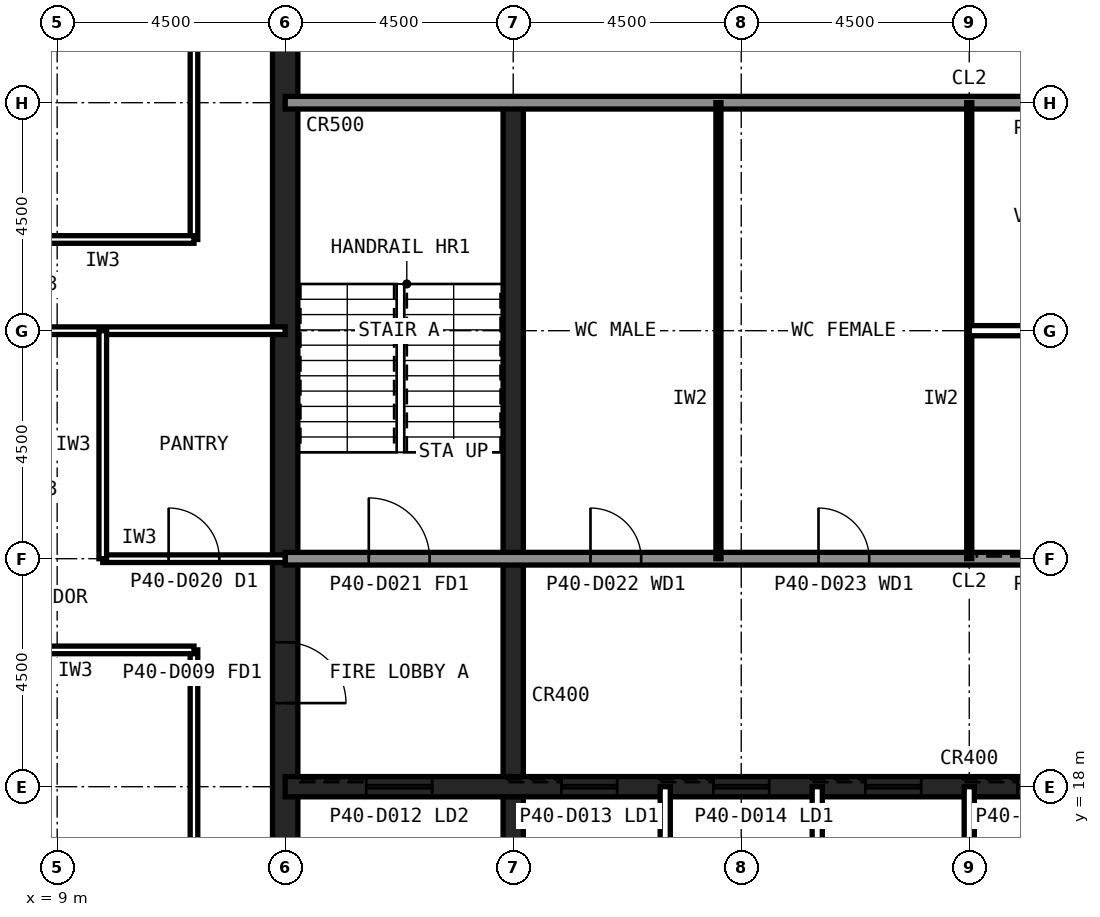
"""IFC4 building model, lengths in metres.
Left out: names, types, materials, properties, quantities, classifications, styles, units other than length and angle.
Written with IfcOpenShell. Run it as: python <this file> out.ifc"""

import sys

from ifc_helpers import new_model, si_unit, direction, frame, frame_2d, origin, place, context, subcontext, project, spatial, rectangle, extrude, element, fill, save


model = new_model("IFC4")
c1 = context("Model", 3, precision=1e-05, world=origin(), true_north=direction((0.0, 1.0)))
c2 = subcontext(c1, "Body", "Model", "MODEL_VIEW")
j1 = project(units=[si_unit("LENGTHUNIT", "METRE"), si_unit("PLANEANGLEUNIT", "RADIAN")], contexts=[c1])
p1 = place(None, origin())
s1 = spatial("IfcSite", under=j1, at=p1, CompositionType="ELEMENT")
p2 = place(p1, origin())
s2 = spatial("IfcBuilding", under=s1, at=p2, CompositionType="ELEMENT")
p3 = place(p2, frame((0.0, 0.0, 167.6)))
s3 = spatial("IfcBuildingStorey", under=s2, at=p3, CompositionType="ELEMENT", Elevation=167.6)
p4 = place(p3, frame((13.5, 40.5, 0.0), z_axis=(0.0, 0.0, 1.0), x_axis=(0.0, -1.0, 0.0)))
e1 = element("IfcWall", 1, at=p4, inside=s3, PredefinedType="SHEAR", context=c2, shape_type="SweptSolid", body=[
    extrude(rectangle(XDim=27.0, YDim=0.5, at=frame_2d((13.5, 0.0))), origin(), (0.0, 0.0, 1.0), 4.0),
])
p5 = place(p4, frame((19.65, 0.0, 0.0)))
e2 = element("IfcOpeningElement", 2, at=p5, cuts=e1, PredefinedType="OPENING", context=c2, shape_type="SweptSolid", body=[
    extrude(rectangle(XDim=1.2, YDim=2.1, at=frame_2d((0.6, 1.05))), frame((0.0, 0.26, 0.0), z_axis=(0.0, -1.0, 0.0), x_axis=(1.0, 0.0, 0.0)), (0.0, 0.0, 1.0), 0.52),
])
p6 = place(p4, frame((5.85, 0.0, 0.0)))
e3 = element("IfcOpeningElement", 3, at=p6, cuts=e1, PredefinedType="OPENING", context=c2, shape_type="SweptSolid", body=[
    extrude(rectangle(XDim=1.8, YDim=2.1, at=frame_2d((0.9, 1.05))), frame((0.0, 0.26, 0.0), z_axis=(0.0, -1.0, 0.0), x_axis=(1.0, 0.0, 0.0)), (0.0, 0.0, 1.0), 0.52),
])
p7 = place(p3, frame((18.0, 13.5, 0.0), z_axis=(0.0, 0.0, 1.0), x_axis=(0.0, 1.0, 0.0)))
e4 = element("IfcWall", 4, at=p7, inside=s3, PredefinedType="SHEAR", context=c2, shape_type="SweptSolid", body=[
    extrude(rectangle(XDim=18.0, YDim=0.4, at=frame_2d((9.0, 0.0))), origin(), (0.0, 0.0, 1.0), 4.0),
])
p8 = place(p3, frame((13.5, 18.0, 0.0), z_axis=(0.0, 0.0, 1.0), x_axis=(1.0, 0.0, 0.0)))
e5 = element("IfcWall", 5, at=p8, inside=s3, PredefinedType="SHEAR", context=c2, shape_type="SweptSolid", body=[
    extrude(rectangle(XDim=27.0, YDim=0.4, at=frame_2d((13.5, 0.0))), origin(), (0.0, 0.0, 1.0), 4.0),
])
p9 = place(p8, frame((24.3, 0.0, 0.0)))
e6 = element("IfcOpeningElement", 6, at=p9, cuts=e5, PredefinedType="OPENING", context=c2, shape_type="SweptSolid", body=[
    extrude(rectangle(XDim=0.9, YDim=2.1, at=frame_2d((0.45, 1.05))), frame((0.0, 0.21, 0.0), z_axis=(0.0, -1.0, 0.0), x_axis=(1.0, 0.0, 0.0)), (0.0, 0.0, 1.0), 0.42),
])
p10 = place(p8, frame((5.45, 0.0, 0.0)))
e7 = element("IfcOpeningElement", 7, at=p10, cuts=e5, PredefinedType="OPENING", context=c2, shape_type="SweptSolid", body=[
    extrude(rectangle(XDim=1.1, YDim=2.1, at=frame_2d((0.55, 1.05))), frame((0.0, 0.21, 0.0), z_axis=(0.0, -1.0, 0.0), x_axis=(1.0, 0.0, 0.0)), (0.0, 0.0, 1.0), 0.42),
])
p11 = place(p8, frame((8.45, 0.0, 0.0)))
e8 = element("IfcOpeningElement", 8, at=p11, cuts=e5, PredefinedType="OPENING", context=c2, shape_type="SweptSolid", body=[
    extrude(rectangle(XDim=1.1, YDim=2.1, at=frame_2d((0.55, 1.05))), frame((0.0, 0.21, 0.0), z_axis=(0.0, -1.0, 0.0), x_axis=(1.0, 0.0, 0.0)), (0.0, 0.0, 1.0), 0.42),
])
p12 = place(p8, frame((11.45, 0.0, 0.0)))
e9 = element("IfcOpeningElement", 9, at=p12, cuts=e5, PredefinedType="OPENING", context=c2, shape_type="SweptSolid", body=[
    extrude(rectangle(XDim=1.1, YDim=2.1, at=frame_2d((0.55, 1.05))), frame((0.0, 0.21, 0.0), z_axis=(0.0, -1.0, 0.0), x_axis=(1.0, 0.0, 0.0)), (0.0, 0.0, 1.0), 0.42),
])
p13 = place(p8, frame((14.45, 0.0, 0.0)))
e10 = element("IfcOpeningElement", 10, at=p13, cuts=e5, PredefinedType="OPENING", context=c2, shape_type="SweptSolid", body=[
    extrude(rectangle(XDim=1.1, YDim=2.1, at=frame_2d((0.55, 1.05))), frame((0.0, 0.21, 0.0), z_axis=(0.0, -1.0, 0.0), x_axis=(1.0, 0.0, 0.0)), (0.0, 0.0, 1.0), 0.42),
])
p14 = place(p8, frame((17.45, 0.0, 0.0)))
e11 = element("IfcOpeningElement", 11, at=p14, cuts=e5, PredefinedType="OPENING", context=c2, shape_type="SweptSolid", body=[
    extrude(rectangle(XDim=1.1, YDim=2.1, at=frame_2d((0.55, 1.05))), frame((0.0, 0.21, 0.0), z_axis=(0.0, -1.0, 0.0), x_axis=(1.0, 0.0, 0.0)), (0.0, 0.0, 1.0), 0.42),
])
p15 = place(p8, frame((20.45, 0.0, 0.0)))
e12 = element("IfcOpeningElement", 12, at=p15, cuts=e5, PredefinedType="OPENING", context=c2, shape_type="SweptSolid", body=[
    extrude(rectangle(XDim=1.1, YDim=2.1, at=frame_2d((0.55, 1.05))), frame((0.0, 0.21, 0.0), z_axis=(0.0, -1.0, 0.0), x_axis=(1.0, 0.0, 0.0)), (0.0, 0.0, 1.0), 0.42),
])
p16 = place(p8, frame((1.6, 0.0, 0.0)))
e13 = element("IfcOpeningElement", 13, at=p16, cuts=e5, PredefinedType="OPENING", context=c2, shape_type="SweptSolid", body=[
    extrude(rectangle(XDim=1.3, YDim=2.2, at=frame_2d((0.65, 1.1))), frame((0.0, 0.21, 0.0), z_axis=(0.0, -1.0, 0.0), x_axis=(1.0, 0.0, 0.0)), (0.0, 0.0, 1.0), 0.42),
])
p17 = place(p3, frame((13.5, 22.5, 0.0), z_axis=(0.0, 0.0, 1.0), x_axis=(1.0, 0.0, 0.0)))
e14 = element("IfcWall", 14, at=p17, inside=s3, PredefinedType="SOLIDWALL", context=c2, shape_type="SweptSolid", body=[
    extrude(rectangle(XDim=27.0, YDim=0.25, at=frame_2d((13.5, 0.0))), origin(), (0.0, 0.0, 1.0), 3.84),
])
p18 = place(p17, frame((1.65, 0.0, 0.0)))
e15 = element("IfcOpeningElement", 15, at=p18, cuts=e14, PredefinedType="OPENING", context=c2, shape_type="SweptSolid", body=[
    extrude(rectangle(XDim=1.2, YDim=2.1, at=frame_2d((0.6, 1.05))), frame((0.0, 0.135, 0.0), z_axis=(0.0, -1.0, 0.0), x_axis=(1.0, 0.0, 0.0)), (0.0, 0.0, 1.0), 0.27),
])
p19 = place(p17, frame((6.025, 0.0, 0.0)))
e16 = element("IfcOpeningElement", 16, at=p19, cuts=e14, PredefinedType="OPENING", context=c2, shape_type="SweptSolid", body=[
    extrude(rectangle(XDim=1.0, YDim=2.1, at=frame_2d((0.5, 1.05))), frame((0.0, 0.135, 0.0), z_axis=(0.0, -1.0, 0.0), x_axis=(1.0, 0.0, 0.0)), (0.0, 0.0, 1.0), 0.27),
])
p20 = place(p17, frame((10.525, 0.0, 0.0)))
e17 = element("IfcOpeningElement", 17, at=p20, cuts=e14, PredefinedType="OPENING", context=c2, shape_type="SweptSolid", body=[
    extrude(rectangle(XDim=1.0, YDim=2.1, at=frame_2d((0.5, 1.05))), frame((0.0, 0.135, 0.0), z_axis=(0.0, -1.0, 0.0), x_axis=(1.0, 0.0, 0.0)), (0.0, 0.0, 1.0), 0.27),
])
p21 = place(p17, frame((19.75, 0.0, 0.0)))
e18 = element("IfcOpeningElement", 18, at=p21, cuts=e14, PredefinedType="OPENING", context=c2, shape_type="SweptSolid", body=[
    extrude(rectangle(XDim=1.0, YDim=2.1, at=frame_2d((0.5, 1.05))), frame((0.0, 0.135, 0.0), z_axis=(0.0, -1.0, 0.0), x_axis=(1.0, 0.0, 0.0)), (0.0, 0.0, 1.0), 0.27),
])
p22 = place(p17, frame((15.05, 0.0, 0.0)))
e19 = element("IfcOpeningElement", 19, at=p22, cuts=e14, PredefinedType="OPENING", context=c2, shape_type="SweptSolid", body=[
    extrude(rectangle(XDim=1.4, YDim=2.4, at=frame_2d((0.7, 1.2))), frame((0.0, 0.135, 0.0), z_axis=(0.0, -1.0, 0.0), x_axis=(1.0, 0.0, 0.0)), (0.0, 0.0, 1.0), 0.27),
])
p23 = place(p3, frame((13.5, 31.5, 0.0), z_axis=(0.0, 0.0, 1.0), x_axis=(1.0, 0.0, 0.0)))
e20 = element("IfcWall", 20, at=p23, inside=s3, PredefinedType="SOLIDWALL", context=c2, shape_type="SweptSolid", body=[
    extrude(rectangle(XDim=27.0, YDim=0.25, at=frame_2d((13.5, 0.0))), origin(), (0.0, 0.0, 1.0), 3.84),
])
p24 = place(p23, frame((24.15, 0.0, 0.0)))
e21 = element("IfcOpeningElement", 21, at=p24, cuts=e20, PredefinedType="OPENING", context=c2, shape_type="SweptSolid", body=[
    extrude(rectangle(XDim=1.2, YDim=2.1, at=frame_2d((0.6, 1.05))), frame((0.0, 0.135, 0.0), z_axis=(0.0, -1.0, 0.0), x_axis=(1.0, 0.0, 0.0)), (0.0, 0.0, 1.0), 0.27),
])
p25 = place(p23, frame((15.3, 0.0, 0.0)))
e22 = element("IfcOpeningElement", 22, at=p25, cuts=e20, PredefinedType="OPENING", context=c2, shape_type="SweptSolid", body=[
    extrude(rectangle(XDim=0.9, YDim=2.1, at=frame_2d((0.45, 1.05))), frame((0.0, 0.135, 0.0), z_axis=(0.0, -1.0, 0.0), x_axis=(1.0, 0.0, 0.0)), (0.0, 0.0, 1.0), 0.27),
])
p26 = place(p23, frame((19.8, 0.0, 0.0)))
e23 = element("IfcOpeningElement", 23, at=p26, cuts=e20, PredefinedType="OPENING", context=c2, shape_type="SweptSolid", body=[
    extrude(rectangle(XDim=0.9, YDim=2.1, at=frame_2d((0.45, 1.05))), frame((0.0, 0.135, 0.0), z_axis=(0.0, -1.0, 0.0), x_axis=(1.0, 0.0, 0.0)), (0.0, 0.0, 1.0), 0.27),
])
for number, where, z_axis, x_axis in (
    (24, (21.0, 13.5, 0.0), (0.0, 0.0, 1.0), (0.0, 1.0, 0.0)),
    (25, (24.0, 13.5, 0.0), (0.0, 0.0, 1.0), (0.0, 1.0, 0.0)),
    (26, (27.0, 13.5, 0.0), (0.0, 0.0, 1.0), (0.0, 1.0, 0.0)),
):
    element("IfcWall", number, at=place(p3, frame(where, z_axis=z_axis, x_axis=x_axis)), inside=s3, PredefinedType="PARTITIONING", context=c2, shape_type="SweptSolid", body=[
        extrude(rectangle(XDim=4.5, YDim=0.2, at=frame_2d((2.25, 0.0))), origin(), (0.0, 0.0, 1.0), 3.84),
    ])
for number, where, z_axis, x_axis in (
    (27, (22.05, 22.5, 0.0), (0.0, 0.0, 1.0), (0.0, 1.0, 0.0)),
    (28, (27.0, 22.5, 0.0), (0.0, 0.0, 1.0), (0.0, 1.0, 0.0)),
):
    element("IfcWall", number, at=place(p3, frame(where, z_axis=z_axis, x_axis=x_axis)), inside=s3, PredefinedType="PLUMBINGWALL", context=c2, shape_type="SweptSolid", body=[
        extrude(rectangle(XDim=9.0, YDim=0.1, at=frame_2d((4.5, 0.0))), origin(), (0.0, 0.0, 1.0), 3.84),
    ])
p27 = place(p3, frame((27.0, 27.0, 0.0), z_axis=(0.0, 0.0, 1.0), x_axis=(1.0, 0.0, 0.0)))
e29 = element("IfcWall", 29, at=p27, inside=s3, PredefinedType="PARTITIONING", context=c2, shape_type="SweptSolid", body=[
    extrude(rectangle(XDim=9.0, YDim=0.2, at=frame_2d((4.5, 0.0))), origin(), (0.0, 0.0, 1.0), 3.84),
])
p28 = place(p3, frame((0.36, 27.0, 0.0), z_axis=(0.0, 0.0, 1.0), x_axis=(1.0, 0.0, 0.0)))
e30 = element("IfcWall", 30, at=p28, inside=s3, PredefinedType="PARTITIONING", context=c2, shape_type="SweptSolid", body=[
    extrude(rectangle(XDim=13.14, YDim=0.15, at=frame_2d((6.57, 0.0))), origin(), (0.0, 0.0, 1.0), 2.989),
])
p29 = place(p3, frame((11.7, 45.3, 0.0), z_axis=(0.0, 0.0, 1.0), x_axis=(0.0, -1.0, 0.0)))
e31 = element("IfcWall", 31, at=p29, inside=s3, PredefinedType="PARTITIONING", context=c2, shape_type="SweptSolid", body=[
    extrude(rectangle(XDim=16.5, YDim=0.15, at=frame_2d((8.25, 0.0))), origin(), (0.0, 0.0, 1.0), 3.84),
])
p30 = place(p29, frame((7.75, 0.0, 0.0)))
e32 = element("IfcOpeningElement", 32, at=p30, cuts=e31, PredefinedType="OPENING", context=c2, shape_type="SweptSolid", body=[
    extrude(rectangle(XDim=1.0, YDim=2.1, at=frame_2d((0.5, 1.05))), frame((0.0, 0.085, 0.0), z_axis=(0.0, -1.0, 0.0), x_axis=(1.0, 0.0, 0.0)), (0.0, 0.0, 1.0), 0.17),
])
p31 = place(p3, frame((11.7, 28.8, 0.0), z_axis=(0.0, 0.0, 1.0), x_axis=(-1.0, 0.0, 0.0)))
e33 = element("IfcWall", 33, at=p31, inside=s3, PredefinedType="PARTITIONING", context=c2, shape_type="SweptSolid", body=[
    extrude(rectangle(XDim=3.6, YDim=0.15, at=frame_2d((1.8, 0.0))), origin(), (0.0, 0.0, 1.0), 3.84),
])
p32 = place(p3, frame((11.7, 20.7, 0.0), z_axis=(0.0, 0.0, 1.0), x_axis=(0.0, -1.0, 0.0)))
e34 = element("IfcWall", 34, at=p32, inside=s3, PredefinedType="PARTITIONING", context=c2, shape_type="SweptSolid", body=[
    extrude(rectangle(XDim=15.135, YDim=0.15, at=frame_2d((7.568, 0.0))), origin(), (0.0, 0.0, 1.0), 3.84),
])
p33 = place(p32, frame((6.7, 0.0, 0.0)))
e35 = element("IfcOpeningElement", 35, at=p33, cuts=e34, PredefinedType="OPENING", context=c2, shape_type="SweptSolid", body=[
    extrude(rectangle(XDim=1.0, YDim=2.1, at=frame_2d((0.5, 1.05))), frame((0.0, 0.085, 0.0), z_axis=(0.0, -1.0, 0.0), x_axis=(1.0, 0.0, 0.0)), (0.0, 0.0, 1.0), 0.17),
])
p34 = place(p3, frame((8.1, 20.7, 0.0), z_axis=(0.0, 0.0, 1.0), x_axis=(1.0, 0.0, 0.0)))
e36 = element("IfcWall", 36, at=p34, inside=s3, PredefinedType="PARTITIONING", context=c2, shape_type="SweptSolid", body=[
    extrude(rectangle(XDim=3.6, YDim=0.15, at=frame_2d((1.8, 0.0))), origin(), (0.0, 0.0, 1.0), 3.84),
])
p35 = place(p3, frame((9.9, 22.5, 0.0), z_axis=(0.0, 0.0, 1.0), x_axis=(1.0, 0.0, 0.0)))
e37 = element("IfcWall", 37, at=p35, inside=s3, PredefinedType="PARTITIONING", context=c2, shape_type="SweptSolid", body=[
    extrude(rectangle(XDim=3.6, YDim=0.15, at=frame_2d((1.8, 0.0))), origin(), (0.0, 0.0, 1.0), 2.989),
])
p36 = place(p35, frame((1.3, 0.0, 0.0)))
e38 = element("IfcOpeningElement", 38, at=p36, cuts=e37, PredefinedType="OPENING", context=c2, shape_type="SweptSolid", body=[
    extrude(rectangle(XDim=1.0, YDim=2.1, at=frame_2d((0.5, 1.05))), frame((0.0, 0.085, 0.0), z_axis=(0.0, -1.0, 0.0), x_axis=(1.0, 0.0, 0.0)), (0.0, 0.0, 1.0), 0.17),
])
p37 = place(p3, frame((9.9, 27.0, 0.0), z_axis=(0.0, 0.0, 1.0), x_axis=(0.0, -1.0, 0.0)))
e39 = element("IfcWall", 39, at=p37, inside=s3, PredefinedType="PARTITIONING", context=c2, shape_type="SweptSolid", body=[
    extrude(rectangle(XDim=4.5, YDim=0.15, at=frame_2d((2.25, 0.0))), origin(), (0.0, 0.0, 1.0), 3.84),
])
p38 = place(p5, origin())
e40 = element("IfcDoor", 40, at=p38, inside=s3, OperationType="SINGLE_SWING_RIGHT", PredefinedType="DOOR", context=c2, shape_type="SweptSolid", body=[
    extrude(rectangle(XDim=1.2, YDim=2.1, at=frame_2d((0.6, 1.05))), frame((0.0, 0.025, 0.0), z_axis=(0.0, -1.0, 0.0), x_axis=(1.0, 0.0, 0.0)), (0.0, 0.0, 1.0), 0.05),
])
fill(e2, e40)
p39 = place(p18, origin())
e41 = element("IfcDoor", 41, at=p39, inside=s3, OperationType="SINGLE_SWING_LEFT", PredefinedType="DOOR", context=c2, shape_type="SweptSolid", body=[
    extrude(rectangle(XDim=1.2, YDim=2.1, at=frame_2d((0.6, 1.05))), frame((0.0, 0.025, 0.0), z_axis=(0.0, -1.0, 0.0), x_axis=(1.0, 0.0, 0.0)), (0.0, 0.0, 1.0), 0.05),
])
fill(e15, e41)
p40 = place(p19, origin())
e42 = element("IfcDoor", 42, at=p40, inside=s3, OperationType="SINGLE_SWING_LEFT", PredefinedType="DOOR", context=c2, shape_type="SweptSolid", body=[
    extrude(rectangle(XDim=1.0, YDim=2.1, at=frame_2d((0.5, 1.05))), frame((0.0, 0.025, 0.0), z_axis=(0.0, -1.0, 0.0), x_axis=(1.0, 0.0, 0.0)), (0.0, 0.0, 1.0), 0.05),
])
fill(e16, e42)
p41 = place(p20, origin())
e43 = element("IfcDoor", 43, at=p41, inside=s3, OperationType="SINGLE_SWING_LEFT", PredefinedType="DOOR", context=c2, shape_type="SweptSolid", body=[
    extrude(rectangle(XDim=1.0, YDim=2.1, at=frame_2d((0.5, 1.05))), frame((0.0, 0.025, 0.0), z_axis=(0.0, -1.0, 0.0), x_axis=(1.0, 0.0, 0.0)), (0.0, 0.0, 1.0), 0.05),
])
fill(e17, e43)
p42 = place(p10, origin())
e44 = element("IfcDoor", 44, at=p42, inside=s3, OperationType="SLIDING_TO_LEFT", PredefinedType="DOOR", context=c2, shape_type="SweptSolid", body=[
    extrude(rectangle(XDim=1.1, YDim=2.1, at=frame_2d((0.55, 1.05))), frame((0.0, 0.025, 0.0), z_axis=(0.0, -1.0, 0.0), x_axis=(1.0, 0.0, 0.0)), (0.0, 0.0, 1.0), 0.05),
])
fill(e7, e44)
p43 = place(p11, origin())
e45 = element("IfcDoor", 45, at=p43, inside=s3, OperationType="SLIDING_TO_LEFT", PredefinedType="DOOR", context=c2, shape_type="SweptSolid", body=[
    extrude(rectangle(XDim=1.1, YDim=2.1, at=frame_2d((0.55, 1.05))), frame((0.0, 0.025, 0.0), z_axis=(0.0, -1.0, 0.0), x_axis=(1.0, 0.0, 0.0)), (0.0, 0.0, 1.0), 0.05),
])
fill(e8, e45)
p44 = place(p12, origin())
e46 = element("IfcDoor", 46, at=p44, inside=s3, OperationType="SLIDING_TO_LEFT", PredefinedType="DOOR", context=c2, shape_type="SweptSolid", body=[
    extrude(rectangle(XDim=1.1, YDim=2.1, at=frame_2d((0.55, 1.05))), frame((0.0, 0.025, 0.0), z_axis=(0.0, -1.0, 0.0), x_axis=(1.0, 0.0, 0.0)), (0.0, 0.0, 1.0), 0.05),
])
fill(e9, e46)
p45 = place(p13, origin())
e47 = element("IfcDoor", 47, at=p45, inside=s3, OperationType="SLIDING_TO_LEFT", PredefinedType="DOOR", context=c2, shape_type="SweptSolid", body=[
    extrude(rectangle(XDim=1.1, YDim=2.1, at=frame_2d((0.55, 1.05))), frame((0.0, 0.025, 0.0), z_axis=(0.0, -1.0, 0.0), x_axis=(1.0, 0.0, 0.0)), (0.0, 0.0, 1.0), 0.05),
])
fill(e10, e47)
p46 = place(p16, origin())
e48 = element("IfcDoor", 48, at=p46, inside=s3, OperationType="SLIDING_TO_LEFT", PredefinedType="DOOR", context=c2, shape_type="SweptSolid", body=[
    extrude(rectangle(XDim=1.3, YDim=2.2, at=frame_2d((0.65, 1.1))), frame((0.0, 0.025, 0.0), z_axis=(0.0, -1.0, 0.0), x_axis=(1.0, 0.0, 0.0)), (0.0, 0.0, 1.0), 0.05),
])
fill(e13, e48)
p47 = place(p36, origin())
e49 = element("IfcDoor", 49, at=p47, inside=s3, OperationType="SINGLE_SWING_LEFT", PredefinedType="DOOR", context=c2, shape_type="SweptSolid", body=[
    extrude(rectangle(XDim=1.0, YDim=2.1, at=frame_2d((0.5, 1.05))), frame((0.0, 0.025, 0.0), z_axis=(0.0, -1.0, 0.0), x_axis=(1.0, 0.0, 0.0)), (0.0, 0.0, 1.0), 0.05),
])
fill(e38, e49)
save(model, sys.argv[1])
